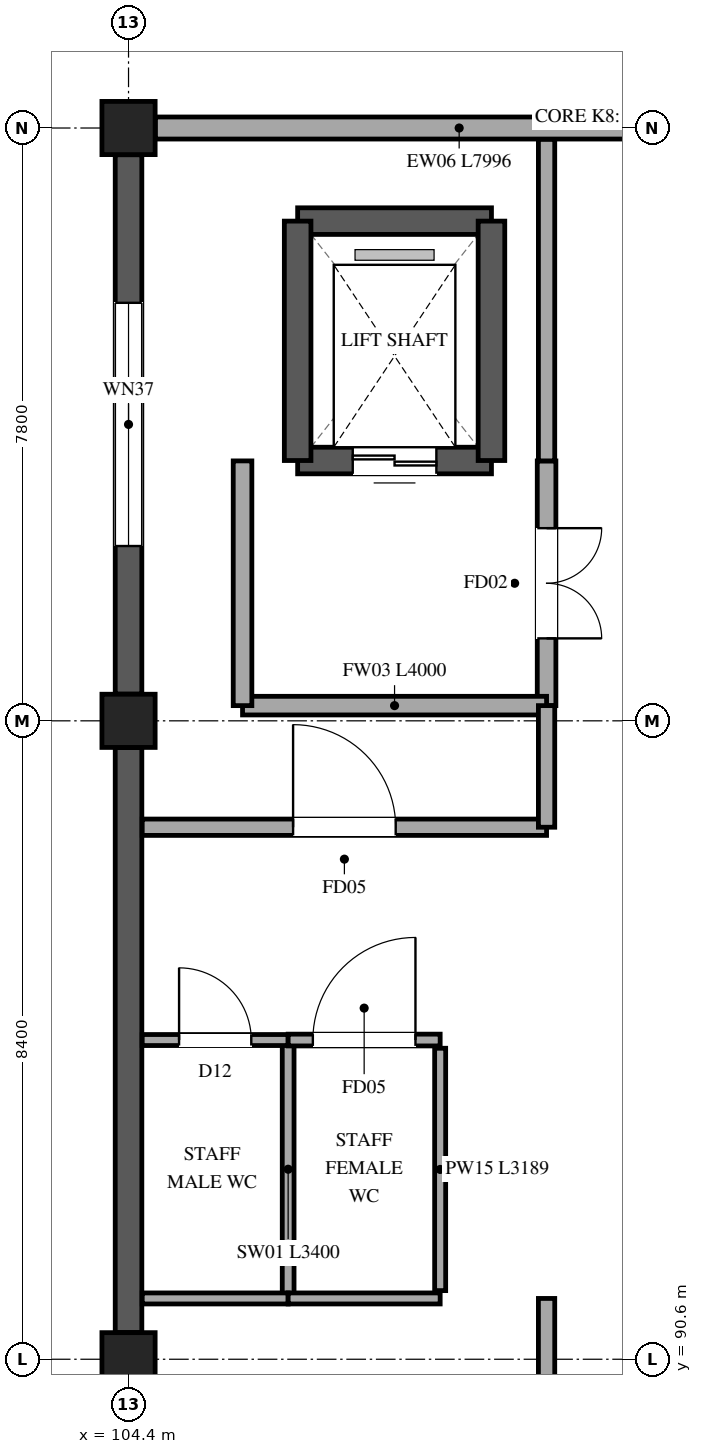
"""IFC4 building model, lengths in metres.
Left out: names, types, materials, properties, quantities, classifications, styles, units other than length and angle.
Written with IfcOpenShell. Run it as: python <this file> out.ifc"""

import sys

from ifc_helpers import new_model, si_unit, direction, frame, frame_2d, origin, origin_2d, place, context, subcontext, project, spatial, rectangle, extrude, element, fill, save


model = new_model("IFC4")
c1 = context("Model", 3, precision=1e-05, world=origin(), true_north=direction((0.0, 1.0)))
c2 = subcontext(c1, "Body", "Model", "MODEL_VIEW")
j1 = project(units=[si_unit("LENGTHUNIT", "METRE"), si_unit("PLANEANGLEUNIT", "RADIAN")], contexts=[c1])
p1 = place(None, origin())
s1 = spatial("IfcSite", under=j1, at=p1, CompositionType="ELEMENT")
p2 = place(p1, origin())
s2 = spatial("IfcBuilding", under=s1, at=p2, CompositionType="ELEMENT")
p3 = place(p2, frame((0.0, 0.0, 31.5)))
s3 = spatial("IfcBuildingStorey", under=s2, at=p3, CompositionType="ELEMENT", Elevation=31.5)
for number, where, z_axis, x_axis in (
    (1, (104.4, 90.6, 0.0), (0.0, 0.0, 1.0), (1.0, 0.0, 0.0)),
    (2, (104.4, 99.0, 0.0), (0.0, 0.0, 1.0), (1.0, 0.0, 0.0)),
    (3, (104.4, 106.8, 0.0), (0.0, 0.0, 1.0), (1.0, 0.0, 0.0)),
):
    element("IfcColumn", number, at=place(p3, frame(where, z_axis=z_axis, x_axis=x_axis)), inside=s3, PredefinedType="COLUMN", context=c2, shape_type="SweptSolid", body=[
        extrude(rectangle(XDim=0.7, YDim=0.7, at=origin_2d()), origin(), (0.0, 0.0, 1.0), 4.8),
    ])
p4 = place(p3, frame((104.4, 90.952, 0.0), z_axis=(0.0, 0.0, 1.0), x_axis=(0.0, 1.0, 0.0)))
e4 = element("IfcWall", 4, at=p4, inside=s3, PredefinedType="STANDARD", context=c2, shape_type="SweptSolid", body=[
    extrude(rectangle(XDim=7.696, YDim=0.35, at=frame_2d((3.848, 0.0))), origin(), (0.0, 0.0, 1.0), 4.49),
])
p5 = place(p3, frame((104.4, 99.352, 0.0), z_axis=(0.0, 0.0, 1.0), x_axis=(0.0, 1.0, 0.0)))
e5 = element("IfcWall", 5, at=p5, inside=s3, PredefinedType="STANDARD", context=c2, shape_type="SweptSolid", body=[
    extrude(rectangle(XDim=7.096, YDim=0.35, at=frame_2d((3.548, 0.0))), origin(), (0.0, 0.0, 1.0), 4.49),
])
p6 = place(p5, frame((1.948, 0.0, 0.85)))
e6 = element("IfcOpeningElement", 6, at=p6, cuts=e5, PredefinedType="OPENING", context=c2, shape_type="SweptSolid", body=[
    extrude(rectangle(XDim=3.2, YDim=1.95, at=frame_2d((1.6, 0.975))), frame((0.0, 0.185, 0.0), z_axis=(0.0, -1.0, 0.0), x_axis=(1.0, 0.0, 0.0)), (0.0, 0.0, 1.0), 0.37),
])
p7 = place(p3, frame((104.752, 106.8, 0.0), z_axis=(0.0, 0.0, 1.0), x_axis=(1.0, 0.0, 0.0)))
e7 = element("IfcWall", 7, at=p7, inside=s3, PredefinedType="STANDARD", context=c2, shape_type="SweptSolid", body=[
    extrude(rectangle(XDim=7.996, YDim=0.29, at=frame_2d((3.998, 0.0))), origin(), (0.0, 0.0, 1.0), 3.97),
])
p8 = place(p3, frame((106.625, 105.575, 0.0), z_axis=(0.0, 0.0, 1.0), x_axis=(1.0, 0.0, 0.0)))
e8 = element("IfcWall", 8, at=p8, inside=s3, PredefinedType="SHEAR", context=c2, shape_type="SweptSolid", body=[
    extrude(rectangle(XDim=2.55, YDim=0.35, at=frame_2d((1.275, 0.0))), origin(), (0.0, 0.0, 1.0), 4.8),
])
p9 = place(p3, frame((109.175, 102.425, 0.0), z_axis=(0.0, 0.0, 1.0), x_axis=(-1.0, 0.0, 0.0)))
e9 = element("IfcWall", 9, at=p9, inside=s3, PredefinedType="SHEAR", context=c2, shape_type="SweptSolid", body=[
    extrude(rectangle(XDim=2.55, YDim=0.35, at=frame_2d((1.275, 0.0))), origin(), (0.0, 0.0, 1.0), 4.8),
])
p10 = place(p9, frame((0.725, 0.0, 0.0)))
e10 = element("IfcOpeningElement", 10, at=p10, cuts=e9, PredefinedType="OPENING", context=c2, shape_type="SweptSolid", body=[
    extrude(rectangle(XDim=1.1, YDim=2.2, at=frame_2d((0.55, 1.1))), frame((0.0, 0.185, 0.0), z_axis=(0.0, -1.0, 0.0), x_axis=(1.0, 0.0, 0.0)), (0.0, 0.0, 1.0), 0.37),
])
for number, where, z_axis, x_axis in (
    (11, (106.625, 102.425, 0.0), (0.0, 0.0, 1.0), (0.0, 1.0, 0.0)),
    (12, (109.175, 105.575, 0.0), (0.0, 0.0, 1.0), (0.0, -1.0, 0.0)),
):
    element("IfcWall", number, at=place(p3, frame(where, z_axis=z_axis, x_axis=x_axis)), inside=s3, PredefinedType="SHEAR", context=c2, shape_type="SweptSolid", body=[
        extrude(rectangle(XDim=3.15, YDim=0.35, at=frame_2d((1.575, 0.0))), origin(), (0.0, 0.0, 1.0), 4.8),
    ])
p11 = place(p3, frame((109.9, 102.42, 0.0), z_axis=(0.0, 0.0, 1.0), x_axis=(0.0, -1.0, 0.0)))
e13 = element("IfcWall", 13, at=p11, inside=s3, PredefinedType="STANDARD", context=c2, shape_type="SweptSolid", body=[
    extrude(rectangle(XDim=3.22, YDim=0.245, at=frame_2d((1.61, 0.0))), origin(), (0.0, 0.0, 1.0), 3.775),
])
p12 = place(p11, frame((0.885, 0.0, 0.0)))
e14 = element("IfcOpeningElement", 14, at=p12, cuts=e13, PredefinedType="OPENING", context=c2, shape_type="SweptSolid", body=[
    extrude(rectangle(XDim=1.45, YDim=2.2, at=frame_2d((0.725, 1.1))), frame((0.0, 0.133, 0.0), z_axis=(0.0, -1.0, 0.0), x_axis=(1.0, 0.0, 0.0)), (0.0, 0.0, 1.0), 0.265),
])
p13 = place(p3, frame((109.9, 99.2, 0.0), z_axis=(0.0, 0.0, 1.0), x_axis=(-1.0, 0.0, 0.0)))
e15 = element("IfcWall", 15, at=p13, inside=s3, PredefinedType="STANDARD", context=c2, shape_type="SweptSolid", body=[
    extrude(rectangle(XDim=4.0, YDim=0.245, at=frame_2d((2.0, 0.0))), origin(), (0.0, 0.0, 1.0), 3.775),
])
p14 = place(p3, frame((105.9, 99.2, 0.0), z_axis=(0.0, 0.0, 1.0), x_axis=(0.0, 1.0, 0.0)))
e16 = element("IfcWall", 16, at=p14, inside=s3, PredefinedType="STANDARD", context=c2, shape_type="SweptSolid", body=[
    extrude(rectangle(XDim=3.22, YDim=0.245, at=frame_2d((1.61, 0.0))), origin(), (0.0, 0.0, 1.0), 3.775),
])
p15 = place(p3, frame((106.5, 94.8, 0.0), z_axis=(0.0, 0.0, 1.0), x_axis=(0.0, -1.0, 0.0)))
e17 = element("IfcWall", 17, at=p15, inside=s3, PredefinedType="MOVABLE", context=c2, shape_type="SweptSolid", body=[
    extrude(rectangle(XDim=3.4, YDim=0.155, at=frame_2d((1.7, 0.0))), origin(), (0.0, 0.0, 1.0), 4.46),
])
p16 = place(p3, frame((104.58, 94.8, 0.0), z_axis=(0.0, 0.0, 1.0), x_axis=(1.0, 0.0, 0.0)))
e18 = element("IfcWall", 18, at=p16, inside=s3, PredefinedType="PARTITIONING", context=c2, shape_type="SweptSolid", body=[
    extrude(rectangle(XDim=1.92, YDim=0.145, at=frame_2d((0.96, 0.0))), origin(), (0.0, 0.0, 1.0), 3.975),
])
p17 = place(p16, frame((0.485, 0.0, 0.0)))
e19 = element("IfcOpeningElement", 19, at=p17, cuts=e18, PredefinedType="OPENING", context=c2, shape_type="SweptSolid", body=[
    extrude(rectangle(XDim=0.95, YDim=2.15, at=frame_2d((0.475, 1.075))), frame((0.0, 0.083, 0.0), z_axis=(0.0, -1.0, 0.0), x_axis=(1.0, 0.0, 0.0)), (0.0, 0.0, 1.0), 0.165),
])
p18 = place(p3, frame((106.5, 91.4, 0.0), z_axis=(0.0, 0.0, 1.0), x_axis=(-1.0, 0.0, 0.0)))
e20 = element("IfcWall", 20, at=p18, inside=s3, PredefinedType="PARTITIONING", context=c2, shape_type="SweptSolid", body=[
    extrude(rectangle(XDim=1.92, YDim=0.145, at=frame_2d((0.96, 0.0))), origin(), (0.0, 0.0, 1.0), 3.975),
])
p19 = place(p3, frame((106.5, 94.8, 0.0), z_axis=(0.0, 0.0, 1.0), x_axis=(1.0, 0.0, 0.0)))
e21 = element("IfcWall", 21, at=p19, inside=s3, PredefinedType="MOVABLE", context=c2, shape_type="SweptSolid", body=[
    extrude(rectangle(XDim=2.0, YDim=0.155, at=frame_2d((1.0, 0.0))), origin(), (0.0, 0.0, 1.0), 4.46),
])
p20 = place(p19, frame((0.325, 0.0, 0.0)))
e22 = element("IfcOpeningElement", 22, at=p20, cuts=e21, PredefinedType="OPENING", context=c2, shape_type="SweptSolid", body=[
    extrude(rectangle(XDim=1.35, YDim=2.2, at=frame_2d((0.675, 1.1))), frame((0.0, 0.087, 0.0), z_axis=(0.0, -1.0, 0.0), x_axis=(1.0, 0.0, 0.0)), (0.0, 0.0, 1.0), 0.175),
])
p21 = place(p3, frame((108.5, 91.4, 0.0), z_axis=(0.0, 0.0, 1.0), x_axis=(-1.0, 0.0, 0.0)))
e23 = element("IfcWall", 23, at=p21, inside=s3, PredefinedType="PARTITIONING", context=c2, shape_type="SweptSolid", body=[
    extrude(rectangle(XDim=2.0, YDim=0.145, at=frame_2d((1.0, 0.0))), origin(), (0.0, 0.0, 1.0), 4.46),
])
p22 = place(p3, frame((109.9, 80.7, 0.0), z_axis=(0.0, 0.0, 1.0), x_axis=(0.0, 1.0, 0.0)))
e24 = element("IfcWall", 24, at=p22, inside=s3, PredefinedType="PARTITIONING", context=c2, shape_type="SweptSolid", body=[
    extrude(rectangle(XDim=10.7, YDim=0.215, at=frame_2d((5.35, 0.0))), origin(), (0.0, 0.0, 1.0), 3.775),
])
p23 = place(p22, frame((4.675, 0.0, 0.0)))
e25 = element("IfcOpeningElement", 25, at=p23, cuts=e24, PredefinedType="OPENING", context=c2, shape_type="SweptSolid", body=[
    extrude(rectangle(XDim=1.35, YDim=2.2, at=frame_2d((0.675, 1.1))), frame((0.0, 0.118, 0.0), z_axis=(0.0, -1.0, 0.0), x_axis=(1.0, 0.0, 0.0)), (0.0, 0.0, 1.0), 0.235),
])
p24 = place(p3, frame((104.58, 97.6, 0.0), z_axis=(0.0, 0.0, 1.0), x_axis=(1.0, 0.0, 0.0)))
e26 = element("IfcWall", 26, at=p24, inside=s3, PredefinedType="PARTITIONING", context=c2, shape_type="SweptSolid", body=[
    extrude(rectangle(XDim=5.32, YDim=0.215, at=frame_2d((2.66, 0.0))), origin(), (0.0, 0.0, 1.0), 3.975),
])
p25 = place(p24, frame((1.985, 0.0, 0.0)))
e27 = element("IfcOpeningElement", 27, at=p25, cuts=e26, PredefinedType="OPENING", context=c2, shape_type="SweptSolid", body=[
    extrude(rectangle(XDim=1.35, YDim=2.2, at=frame_2d((0.675, 1.1))), frame((0.0, 0.118, 0.0), z_axis=(0.0, -1.0, 0.0), x_axis=(1.0, 0.0, 0.0)), (0.0, 0.0, 1.0), 0.235),
])
p26 = place(p3, frame((109.9, 97.6, 0.0), z_axis=(0.0, 0.0, 1.0), x_axis=(0.0, 1.0, 0.0)))
e28 = element("IfcWall", 28, at=p26, inside=s3, PredefinedType="PARTITIONING", context=c2, shape_type="SweptSolid", body=[
    extrude(rectangle(XDim=1.6, YDim=0.215, at=frame_2d((0.8, 0.0))), origin(), (0.0, 0.0, 1.0), 3.775),
])
p27 = place(p3, frame((109.9, 102.42, 0.0), z_axis=(0.0, 0.0, 1.0), x_axis=(0.0, 1.0, 0.0)))
e29 = element("IfcWall", 29, at=p27, inside=s3, PredefinedType="PARTITIONING", context=c2, shape_type="SweptSolid", body=[
    extrude(rectangle(XDim=4.23, YDim=0.215, at=frame_2d((2.115, 0.0))), origin(), (0.0, 0.0, 1.0), 3.975),
])
p28 = place(p3, frame((108.5, 94.692, 0.0), z_axis=(0.0, 0.0, 1.0), x_axis=(0.0, -1.0, 0.0)))
e30 = element("IfcWall", 30, at=p28, inside=s3, PredefinedType="PARTITIONING", context=c2, shape_type="SweptSolid", body=[
    extrude(rectangle(XDim=3.189, YDim=0.145, at=frame_2d((1.594, 0.0))), origin(), (0.0, 0.0, 1.0), 4.46),
])
p29 = place(p6, origin())
e31 = element("IfcWindow", 31, at=p29, inside=s3, PartitioningType="TRIPLE_PANEL_VERTICAL", PredefinedType="WINDOW", context=c2, shape_type="SweptSolid", body=[
    extrude(rectangle(XDim=3.2, YDim=1.95, at=frame_2d((1.6, 0.975))), frame((0.0, 0.03, 0.0), z_axis=(0.0, -1.0, 0.0), x_axis=(1.0, 0.0, 0.0)), (0.0, 0.0, 1.0), 0.06),
])
fill(e6, e31)
p30 = place(p10, origin())
e32 = element("IfcDoor", 32, at=p30, inside=s3, OperationType="DOUBLE_DOOR_SLIDING", PredefinedType="DOOR", context=c2, shape_type="SweptSolid", body=[
    extrude(rectangle(XDim=1.1, YDim=2.2, at=frame_2d((0.55, 1.1))), frame((0.0, 0.025, 0.0), z_axis=(0.0, -1.0, 0.0), x_axis=(1.0, 0.0, 0.0)), (0.0, 0.0, 1.0), 0.05),
])
fill(e10, e32)
p31 = place(p12, origin())
e33 = element("IfcDoor", 33, at=p31, inside=s3, OperationType="DOUBLE_DOOR_SINGLE_SWING", PredefinedType="DOOR", context=c2, shape_type="SweptSolid", body=[
    extrude(rectangle(XDim=1.45, YDim=2.2, at=frame_2d((0.725, 1.1))), frame((0.0, 0.025, 0.0), z_axis=(0.0, -1.0, 0.0), x_axis=(1.0, 0.0, 0.0)), (0.0, 0.0, 1.0), 0.05),
])
fill(e14, e33)
p32 = place(p17, origin())
e34 = element("IfcDoor", 34, at=p32, inside=s3, OperationType="SINGLE_SWING_LEFT", PredefinedType="DOOR", context=c2, shape_type="SweptSolid", body=[
    extrude(rectangle(XDim=0.95, YDim=2.15, at=frame_2d((0.475, 1.075))), frame((0.0, 0.025, 0.0), z_axis=(0.0, -1.0, 0.0), x_axis=(1.0, 0.0, 0.0)), (0.0, 0.0, 1.0), 0.05),
])
fill(e19, e34)
p33 = place(p20, origin())
e35 = element("IfcDoor", 35, at=p33, inside=s3, OperationType="SINGLE_SWING_RIGHT", PredefinedType="DOOR", context=c2, shape_type="SweptSolid", body=[
    extrude(rectangle(XDim=1.35, YDim=2.2, at=frame_2d((0.675, 1.1))), frame((0.0, 0.025, 0.0), z_axis=(0.0, -1.0, 0.0), x_axis=(1.0, 0.0, 0.0)), (0.0, 0.0, 1.0), 0.05),
])
fill(e22, e35)
p34 = place(p25, origin())
e36 = element("IfcDoor", 36, at=p34, inside=s3, OperationType="SINGLE_SWING_LEFT", PredefinedType="DOOR", context=c2, shape_type="SweptSolid", body=[
    extrude(rectangle(XDim=1.35, YDim=2.2, at=frame_2d((0.675, 1.1))), frame((0.0, 0.025, 0.0), z_axis=(0.0, -1.0, 0.0), x_axis=(1.0, 0.0, 0.0)), (0.0, 0.0, 1.0), 0.05),
])
fill(e27, e36)
save(model, sys.argv[1])
